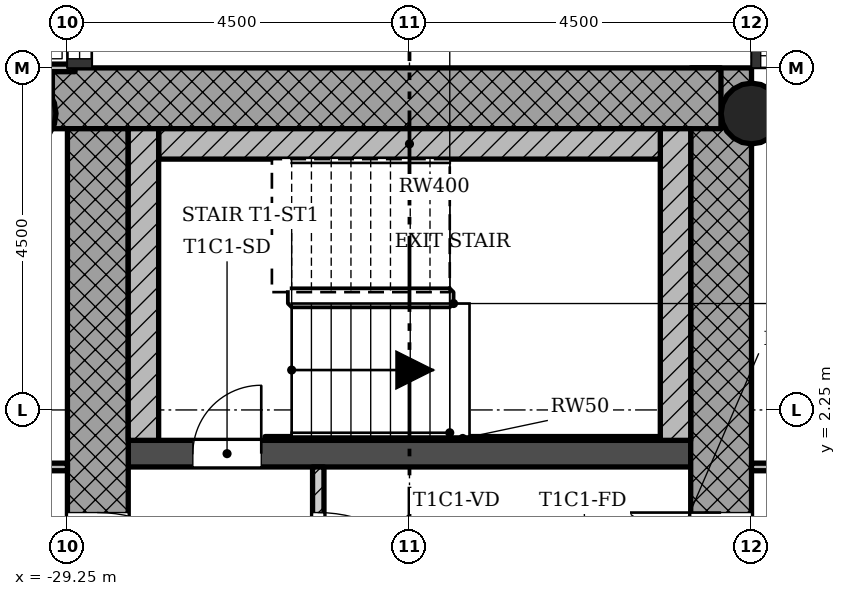
"""IFC4 building model, lengths in metres.
Left out: names, types, materials, properties, quantities, classifications, styles, units other than length and angle.
Written with IfcOpenShell. Run it as: python <this file> out.ifc"""

import sys

from ifc_helpers import new_model, si_unit, direction, frame, frame_2d, origin, origin_2d, place, context, subcontext, project, spatial, rectangle, hollow_circle, extrude, element, fill, save


model = new_model("IFC4")
c1 = context("Model", 3, precision=1e-05, world=origin(), true_north=direction((0.0, 1.0)))
c2 = subcontext(c1, "Body", "Model", "MODEL_VIEW")
j1 = project(units=[si_unit("LENGTHUNIT", "METRE"), si_unit("PLANEANGLEUNIT", "RADIAN")], contexts=[c1])
p1 = place(None, origin())
s1 = spatial("IfcSite", under=j1, at=p1, CompositionType="ELEMENT")
p2 = place(p1, origin())
s2 = spatial("IfcBuilding", under=s1, at=p2, CompositionType="ELEMENT")
p3 = place(p2, frame((0.0, 0.0, 137.1)))
s3 = spatial("IfcBuildingStorey", under=s2, at=p3, CompositionType="ELEMENT", Elevation=137.1)
p4 = place(p3, frame((-20.65, -5.95, 0.0), z_axis=(0.0, 0.0, 1.0), x_axis=(0.0, 1.0, 0.0)))
e1 = element("IfcWall", 1, at=p4, inside=s3, PredefinedType="SHEAR", context=c2, shape_type="SweptSolid", body=[
    extrude(rectangle(XDim=12.7, YDim=0.8, at=frame_2d((6.35, 0.0))), origin(), (0.0, 0.0, 1.0), 3.4),
])
p5 = place(p4, frame((5.05, 0.0, 0.0)))
e2 = element("IfcOpeningElement", 2, at=p5, cuts=e1, PredefinedType="OPENING", context=c2, shape_type="SweptSolid", body=[
    extrude(rectangle(XDim=1.8, YDim=2.1, at=frame_2d((0.9, 1.05))), frame((0.0, 0.41, 0.0), z_axis=(0.0, -1.0, 0.0), x_axis=(1.0, 0.0, 0.0)), (0.0, 0.0, 1.0), 0.82),
])
p6 = place(p3, frame((-20.652, 6.35, 0.0), z_axis=(0.0, 0.0, 1.0), x_axis=(-1.0, 0.0, 0.0)))
e3 = element("IfcWall", 3, at=p6, inside=s3, PredefinedType="SHEAR", context=c2, shape_type="SweptSolid", body=[
    extrude(rectangle(XDim=8.796, YDim=0.8, at=frame_2d((4.398, 0.0))), origin(), (0.0, 0.0, 1.0), 3.4),
])
p7 = place(p3, frame((-28.85, 5.95, 0.0), z_axis=(0.0, 0.0, 1.0), x_axis=(0.0, -1.0, 0.0)))
e4 = element("IfcWall", 4, at=p7, inside=s3, PredefinedType="SHEAR", context=c2, shape_type="SweptSolid", body=[
    extrude(rectangle(XDim=12.7, YDim=0.8, at=frame_2d((6.35, 0.0))), origin(), (0.0, 0.0, 1.0), 3.4),
])
p8 = place(p7, frame((5.05, 0.0, 0.0)))
e5 = element("IfcOpeningElement", 5, at=p8, cuts=e4, PredefinedType="OPENING", context=c2, shape_type="SweptSolid", body=[
    extrude(rectangle(XDim=1.8, YDim=2.1, at=frame_2d((0.9, 1.05))), frame((0.0, 0.41, 0.0), z_axis=(0.0, -1.0, 0.0), x_axis=(1.0, 0.0, 0.0)), (0.0, 0.0, 1.0), 0.82),
])
p9 = place(p3, frame((-28.45, 1.675, 0.0), z_axis=(0.0, 0.0, 1.0), x_axis=(1.0, 0.0, 0.0)))
e6 = element("IfcWall", 6, at=p9, inside=s3, PredefinedType="SHEAR", context=c2, shape_type="SweptSolid", body=[
    extrude(rectangle(XDim=7.4, YDim=0.35, at=frame_2d((3.7, 0.0))), origin(), (0.0, 0.0, 1.0), 3.4),
])
p10 = place(p9, frame((0.85, 0.0, 0.0)))
e7 = element("IfcOpeningElement", 7, at=p10, cuts=e6, PredefinedType="OPENING", context=c2, shape_type="SweptSolid", body=[
    extrude(rectangle(XDim=0.9, YDim=2.1, at=frame_2d((0.45, 1.05))), frame((0.0, 0.185, 0.0), z_axis=(0.0, -1.0, 0.0), x_axis=(1.0, 0.0, 0.0)), (0.0, 0.0, 1.0), 0.37),
])
p11 = place(p3, frame((-20.25, 6.15, 0.0), z_axis=(0.0, 0.0, 1.0), x_axis=(1.0, 0.0, 0.0)))
e8 = element("IfcColumn", 8, at=p11, inside=s3, PredefinedType="COLUMN", context=c2, shape_type="SweptSolid", body=[
    extrude(hollow_circle(Radius=0.4, WallThickness=0.028, at=origin_2d()), origin(), (0.0, 0.0, 1.0), 3.4),
])
p12 = place(p3, frame((-29.85, 6.15, 0.0), z_axis=(0.0, 0.0, 1.0), x_axis=(1.0, 0.0, 0.0)))
e9 = element("IfcColumn", 9, at=p12, inside=s3, PredefinedType="COLUMN", context=c2, shape_type="SweptSolid", body=[
    extrude(hollow_circle(Radius=0.45, WallThickness=0.032, at=origin_2d()), origin(), (0.0, 0.0, 1.0), 3.4),
])
p13 = place(p3, frame((-25.95, -1.5, 0.0), z_axis=(0.0, 0.0, 1.0), x_axis=(0.0, 1.0, 0.0)))
e10 = element("IfcWall", 10, at=p13, inside=s3, PredefinedType="PARTITIONING", context=c2, shape_type="SweptSolid", body=[
    extrude(rectangle(XDim=3.0, YDim=0.15, at=frame_2d((1.5, 0.0))), origin(), (0.0, 0.0, 1.0), 3.0),
])
p14 = place(p13, frame((0.6, 0.0, 0.0)))
e11 = element("IfcOpeningElement", 11, at=p14, cuts=e10, PredefinedType="OPENING", context=c2, shape_type="SweptSolid", body=[
    extrude(rectangle(XDim=1.8, YDim=2.1, at=frame_2d((0.9, 1.05))), frame((0.0, 0.085, 0.0), z_axis=(0.0, -1.0, 0.0), x_axis=(1.0, 0.0, 0.0)), (0.0, 0.0, 1.0), 0.17),
])
p15 = place(p3, frame((-31.5, 1.5, 0.0), z_axis=(0.0, 0.0, 1.0), x_axis=(1.0, 0.0, 0.0)))
e12 = element("IfcWall", 12, at=p15, inside=s3, PredefinedType="PARTITIONING", context=c2, shape_type="SweptSolid", body=[
    extrude(rectangle(XDim=2.25, YDim=0.1, at=frame_2d((1.125, 0.0))), origin(), (0.0, 0.0, 1.0), 3.0),
])
p16 = place(p3, frame((-20.25, 1.5, 0.0), z_axis=(0.0, 0.0, 1.0), x_axis=(1.0, 0.0, 0.0)))
e13 = element("IfcWall", 13, at=p16, inside=s3, PredefinedType="PARTITIONING", context=c2, shape_type="SweptSolid", body=[
    extrude(rectangle(XDim=4.5, YDim=0.1, at=frame_2d((2.25, 0.0))), origin(), (0.0, 0.0, 1.0), 3.0),
])
p17 = place(p16, frame((1.8, 0.0, 0.0)))
e14 = element("IfcOpeningElement", 14, at=p17, cuts=e13, PredefinedType="OPENING", context=c2, shape_type="SweptSolid", body=[
    extrude(rectangle(XDim=0.9, YDim=2.1, at=frame_2d((0.45, 1.05))), frame((0.0, 0.06, 0.0), z_axis=(0.0, -1.0, 0.0), x_axis=(1.0, 0.0, 0.0)), (0.0, 0.0, 1.0), 0.12),
])
p18 = place(p3, frame((-35.1, 6.75, 0.0), z_axis=(0.0, 0.0, 1.0), x_axis=(1.0, 0.0, 0.0)))
e15 = element("IfcWall", 15, at=p18, inside=s3, PredefinedType="PARTITIONING", context=c2, shape_type="SweptSolid", body=[
    extrude(rectangle(XDim=5.95, YDim=0.1, at=frame_2d((2.975, 0.0))), origin(), (0.0, 0.0, 1.0), 3.0),
])
p19 = place(p3, frame((-21.25, 1.85, 0.0), z_axis=(0.0, 0.0, 1.0), x_axis=(0.0, 1.0, 0.0)))
e16 = element("IfcWall", 16, at=p19, inside=s3, PredefinedType="SHEAR", context=c2, shape_type="SweptSolid", body=[
    extrude(rectangle(XDim=4.1, YDim=0.4, at=frame_2d((2.05, 0.0))), origin(), (0.0, 0.0, 1.0), 3.4),
])
p20 = place(p3, frame((-28.05, 5.75, 0.0), z_axis=(0.0, 0.0, 1.0), x_axis=(1.0, 0.0, 0.0)))
e17 = element("IfcWall", 17, at=p20, inside=s3, PredefinedType="SHEAR", context=c2, shape_type="SweptSolid", body=[
    extrude(rectangle(XDim=6.6, YDim=0.4, at=frame_2d((3.3, 0.0))), origin(), (0.0, 0.0, 1.0), 3.4),
])
p21 = place(p3, frame((-28.25, 1.85, 0.0), z_axis=(0.0, 0.0, 1.0), x_axis=(0.0, 1.0, 0.0)))
e18 = element("IfcWall", 18, at=p21, inside=s3, PredefinedType="SHEAR", context=c2, shape_type="SweptSolid", body=[
    extrude(rectangle(XDim=4.1, YDim=0.4, at=frame_2d((2.05, 0.0))), origin(), (0.0, 0.0, 1.0), 3.4),
])
p22 = place(p3, frame((-26.65, 1.875, 0.0), z_axis=(0.0, 0.0, 1.0), x_axis=(1.0, 0.0, 0.0)))
e19 = element("IfcWall", 19, at=p22, inside=s3, PredefinedType="SHEAR", context=c2, shape_type="SweptSolid", body=[
    extrude(rectangle(XDim=5.2, YDim=0.05, at=frame_2d((2.6, 0.0))), origin(), (0.0, 0.0, 1.0), 3.4),
])
p23 = place(p14, origin())
e20 = element("IfcDoor", 20, at=p23, inside=s3, OperationType="SINGLE_SWING_LEFT", PredefinedType="DOOR", context=c2, shape_type="SweptSolid", body=[
    extrude(rectangle(XDim=1.8, YDim=2.1, at=frame_2d((0.9, 1.05))), frame((0.0, 0.025, 0.0), z_axis=(0.0, -1.0, 0.0), x_axis=(1.0, 0.0, 0.0)), (0.0, 0.0, 1.0), 0.05),
])
fill(e11, e20)
p24 = place(p10, origin())
e21 = element("IfcDoor", 21, at=p24, inside=s3, OperationType="SINGLE_SWING_LEFT", PredefinedType="DOOR", context=c2, shape_type="SweptSolid", body=[
    extrude(rectangle(XDim=0.9, YDim=2.1, at=frame_2d((0.45, 1.05))), frame((0.0, 0.025, 0.0), z_axis=(0.0, -1.0, 0.0), x_axis=(1.0, 0.0, 0.0)), (0.0, 0.0, 1.0), 0.05),
])
fill(e7, e21)
p25 = place(p8, origin())
e22 = element("IfcDoor", 22, at=p25, inside=s3, OperationType="SINGLE_SWING_LEFT", PredefinedType="DOOR", context=c2, shape_type="SweptSolid", body=[
    extrude(rectangle(XDim=1.8, YDim=2.1, at=frame_2d((0.9, 1.05))), frame((0.0, 0.025, 0.0), z_axis=(0.0, -1.0, 0.0), x_axis=(1.0, 0.0, 0.0)), (0.0, 0.0, 1.0), 0.05),
])
fill(e5, e22)
p26 = place(p5, origin())
e23 = element("IfcDoor", 23, at=p26, inside=s3, OperationType="SINGLE_SWING_LEFT", PredefinedType="DOOR", context=c2, shape_type="SweptSolid", body=[
    extrude(rectangle(XDim=1.8, YDim=2.1, at=frame_2d((0.9, 1.05))), frame((0.0, 0.025, 0.0), z_axis=(0.0, -1.0, 0.0), x_axis=(1.0, 0.0, 0.0)), (0.0, 0.0, 1.0), 0.05),
])
fill(e2, e23)
save(model, sys.argv[1])
